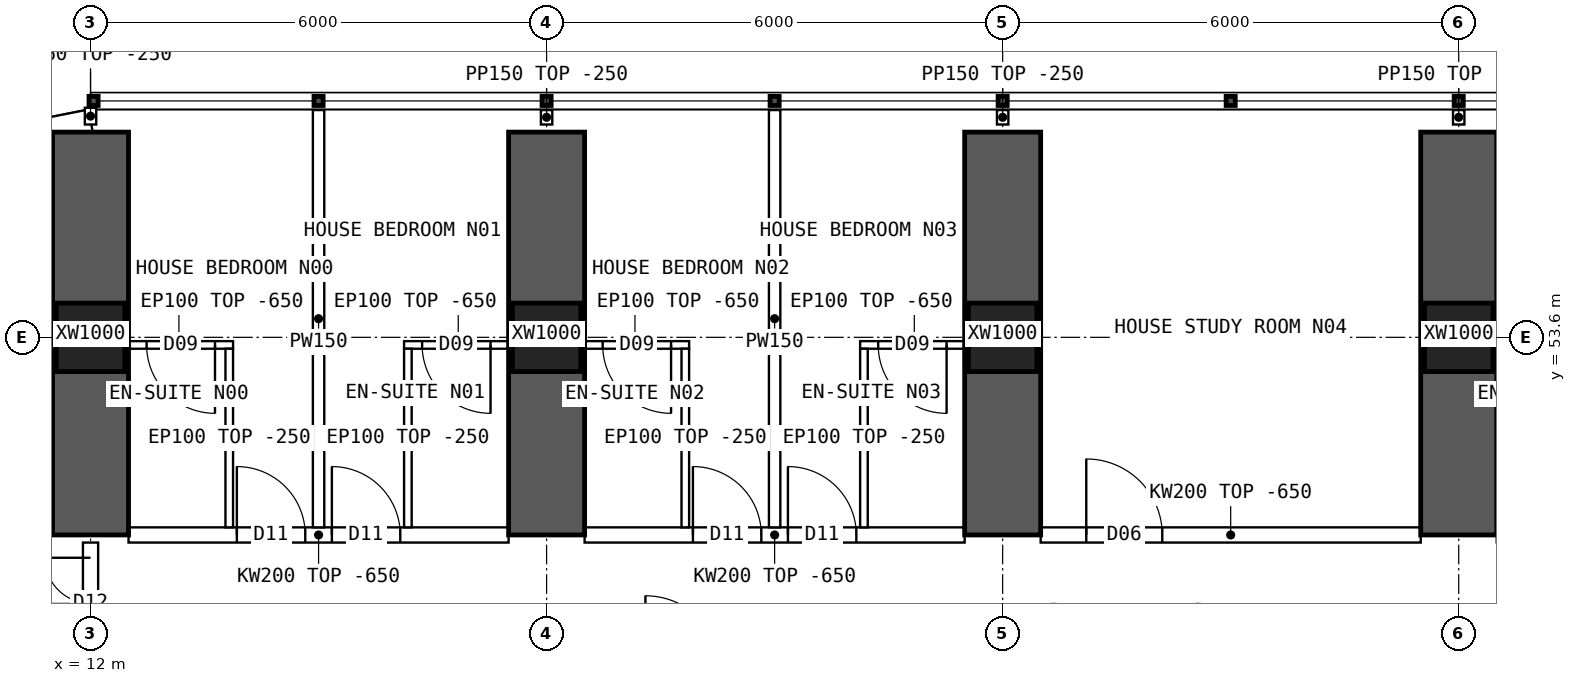
"""IFC4 building model, lengths in metres.
Left out: names, types, materials, properties, quantities, classifications, styles, units other than length and angle.
Written with IfcOpenShell. Run it as: python <this file> out.ifc"""

import sys

from ifc_helpers import new_model, si_unit, direction, frame, frame_2d, origin, origin_2d, place, context, subcontext, project, spatial, polyline, rectangle, hollow_rectangle, outline, extrude, element, fill, save


model = new_model("IFC4")
c1 = context("Model", 3, precision=1e-05, world=origin(), true_north=direction((0.0, 1.0)))
c2 = subcontext(c1, "Body", "Model", "MODEL_VIEW")
j1 = project(units=[si_unit("LENGTHUNIT", "METRE"), si_unit("PLANEANGLEUNIT", "RADIAN")], contexts=[c1])
p1 = place(None, origin())
s1 = spatial("IfcSite", under=j1, at=p1, CompositionType="ELEMENT")
p2 = place(p1, origin())
s2 = spatial("IfcBuilding", under=s1, at=p2, CompositionType="ELEMENT")
p3 = place(p2, frame((0.0, 0.0, 27.7)))
s3 = spatial("IfcBuildingStorey", under=s2, at=p3, CompositionType="ELEMENT", Elevation=27.7)
for number, where, z_axis, x_axis in (
    (1, (12.0, 53.6, 0.0), (0.0, 0.0, 1.0), (1.0, 0.0, 0.0)),
    (2, (18.0, 53.6, 0.0), (0.0, 0.0, 1.0), (1.0, 0.0, 0.0)),
    (3, (24.0, 53.6, 0.0), (0.0, 0.0, 1.0), (1.0, 0.0, 0.0)),
    (4, (30.0, 53.6, 0.0), (0.0, 0.0, 1.0), (1.0, 0.0, 0.0)),
):
    element("IfcColumn", number, at=place(p3, frame(where, z_axis=z_axis, x_axis=x_axis)), inside=s3, PredefinedType="COLUMN", context=c2, shape_type="SweptSolid", body=[
        extrude(hollow_rectangle(XDim=0.9, YDim=0.9, WallThickness=0.09, at=origin_2d()), origin(), (0.0, 0.0, 1.0), 3.75),
    ])
for number, where, z_axis, x_axis in (
    (5, (12.0, 51.0, 0.0), (0.0, 0.0, 1.0), (0.0, 1.0, 0.0)),
    (6, (18.0, 51.0, 0.0), (0.0, 0.0, 1.0), (0.0, 1.0, 0.0)),
    (7, (24.0, 51.0, 0.0), (0.0, 0.0, 1.0), (0.0, 1.0, 0.0)),
    (8, (30.0, 51.0, 0.0), (0.0, 0.0, 1.0), (0.0, 1.0, 0.0)),
):
    element("IfcWall", number, at=place(p3, frame(where, z_axis=z_axis, x_axis=x_axis)), inside=s3, PredefinedType="SHEAR", context=c2, shape_type="SweptSolid", body=[
        extrude(rectangle(XDim=5.3, YDim=1.0, at=frame_2d((2.65, 0.0))), origin(), (0.0, 0.0, 1.0), 3.75),
    ])
p4 = place(p3, frame((12.0, 56.45, 0.0), z_axis=(0.0, 0.0, 1.0), x_axis=(-0.980787251524, -0.195080412259, 0.0)))
e9 = element("IfcWall", 9, at=p4, inside=s3, PredefinedType="SOLIDWALL", context=c2, shape_type="SweptSolid", body=[
    extrude(outline(polyline([(-0.03, -0.15), (3.249, -0.15), (3.189, 0.15), (0.03, 0.15), (-0.03, -0.15)])), origin(), (0.0, 0.0, 1.0), 3.5),
])
p5 = place(p4, frame((0.909, 0.0, 0.9)))
e10 = element("IfcOpeningElement", 10, at=p5, cuts=e9, PredefinedType="OPENING", context=c2, shape_type="SweptSolid", body=[
    extrude(rectangle(XDim=1.4, YDim=1.8, at=frame_2d((0.7, 0.9))), frame((0.0, 0.16, 0.0), z_axis=(0.0, -1.0, 0.0), x_axis=(1.0, 0.0, 0.0)), (0.0, 0.0, 1.0), 0.32),
])
p6 = place(p3, frame((12.5, 51.0, 0.0), z_axis=(0.0, 0.0, 1.0), x_axis=(1.0, 0.0, 0.0)))
e11 = element("IfcWall", 11, at=p6, inside=s3, PredefinedType="SOLIDWALL", context=c2, shape_type="SweptSolid", body=[
    extrude(outline(polyline([(0.0, 0.0), (5.0, 0.0), (5.0, 3.1), (0.0, 3.1), (0.0, 0.0)])), frame((0.0, 0.1, 0.0), z_axis=(0.0, -1.0, 0.0), x_axis=(1.0, 0.0, 0.0)), (0.0, 0.0, 1.0), 0.2),
])
p7 = place(p6, frame((1.425, 0.0, 0.0)))
e12 = element("IfcOpeningElement", 12, at=p7, cuts=e11, PredefinedType="OPENING", context=c2, shape_type="SweptSolid", body=[
    extrude(rectangle(XDim=0.9, YDim=2.1, at=frame_2d((0.45, 1.05))), frame((0.0, 0.11, 0.0), z_axis=(0.0, -1.0, 0.0), x_axis=(1.0, 0.0, 0.0)), (0.0, 0.0, 1.0), 0.22),
])
p8 = place(p6, frame((2.675, 0.0, 0.0)))
e13 = element("IfcOpeningElement", 13, at=p8, cuts=e11, PredefinedType="OPENING", context=c2, shape_type="SweptSolid", body=[
    extrude(rectangle(XDim=0.9, YDim=2.1, at=frame_2d((0.45, 1.05))), frame((0.0, 0.11, 0.0), z_axis=(0.0, -1.0, 0.0), x_axis=(1.0, 0.0, 0.0)), (0.0, 0.0, 1.0), 0.22),
])
p9 = place(p3, frame((18.5, 51.0, 0.0), z_axis=(0.0, 0.0, 1.0), x_axis=(1.0, 0.0, 0.0)))
e14 = element("IfcWall", 14, at=p9, inside=s3, PredefinedType="SOLIDWALL", context=c2, shape_type="SweptSolid", body=[
    extrude(outline(polyline([(0.0, 0.0), (5.0, 0.0), (5.0, 3.1), (0.0, 3.1), (0.0, 0.0)])), frame((0.0, 0.1, 0.0), z_axis=(0.0, -1.0, 0.0), x_axis=(1.0, 0.0, 0.0)), (0.0, 0.0, 1.0), 0.2),
])
p10 = place(p9, frame((1.425, 0.0, 0.0)))
e15 = element("IfcOpeningElement", 15, at=p10, cuts=e14, PredefinedType="OPENING", context=c2, shape_type="SweptSolid", body=[
    extrude(rectangle(XDim=0.9, YDim=2.1, at=frame_2d((0.45, 1.05))), frame((0.0, 0.11, 0.0), z_axis=(0.0, -1.0, 0.0), x_axis=(1.0, 0.0, 0.0)), (0.0, 0.0, 1.0), 0.22),
])
p11 = place(p9, frame((2.675, 0.0, 0.0)))
e16 = element("IfcOpeningElement", 16, at=p11, cuts=e14, PredefinedType="OPENING", context=c2, shape_type="SweptSolid", body=[
    extrude(rectangle(XDim=0.9, YDim=2.1, at=frame_2d((0.45, 1.05))), frame((0.0, 0.11, 0.0), z_axis=(0.0, -1.0, 0.0), x_axis=(1.0, 0.0, 0.0)), (0.0, 0.0, 1.0), 0.22),
])
p12 = place(p3, frame((24.5, 51.0, 0.0), z_axis=(0.0, 0.0, 1.0), x_axis=(1.0, 0.0, 0.0)))
e17 = element("IfcWall", 17, at=p12, inside=s3, PredefinedType="SOLIDWALL", context=c2, shape_type="SweptSolid", body=[
    extrude(outline(polyline([(0.0, 0.0), (5.0, 0.0), (5.0, 3.1), (0.0, 3.1), (0.0, 0.0)])), frame((0.0, 0.1, 0.0), z_axis=(0.0, -1.0, 0.0), x_axis=(1.0, 0.0, 0.0)), (0.0, 0.0, 1.0), 0.2),
])
p13 = place(p12, frame((0.6, 0.0, 0.0)))
e18 = element("IfcOpeningElement", 18, at=p13, cuts=e17, PredefinedType="OPENING", context=c2, shape_type="SweptSolid", body=[
    extrude(rectangle(XDim=1.0, YDim=2.1, at=frame_2d((0.5, 1.05))), frame((0.0, 0.11, 0.0), z_axis=(0.0, -1.0, 0.0), x_axis=(1.0, 0.0, 0.0)), (0.0, 0.0, 1.0), 0.22),
])
p14 = place(p3, frame((15.0, 56.59, 0.0), z_axis=(0.0, 0.0, 1.0), x_axis=(0.0, -1.0, 0.0)))
e19 = element("IfcWall", 19, at=p14, inside=s3, PredefinedType="PARTITIONING", context=c2, shape_type="SweptSolid", body=[
    extrude(outline(polyline([(0.0, 0.0), (5.49, 0.0), (5.49, 3.1), (5.442, 3.1), (5.44, 3.5), (3.192, 3.5), (3.19, 3.1), (2.792, 3.1), (2.79, 3.5), (0.0, 3.5), (0.0, 0.0)])), frame((0.0, 0.075, 0.0), z_axis=(0.0, -1.0, 0.0), x_axis=(1.0, 0.0, 0.0)), (0.0, 0.0, 1.0), 0.15),
])
p15 = place(p3, frame((12.45, 53.5, 0.0), z_axis=(0.0, 0.0, 1.0), x_axis=(1.0, 0.0, 0.0)))
e20 = element("IfcWall", 20, at=p15, inside=s3, PredefinedType="PARTITIONING", context=c2, shape_type="SweptSolid", body=[
    extrude(outline(polyline([(0.0, 0.0), (1.425, 0.0), (1.425, 3.1), (0.0, 3.1), (0.0, 0.0)])), frame((0.0, 0.05, 0.0), z_axis=(0.0, -1.0, 0.0), x_axis=(1.0, 0.0, 0.0)), (0.0, 0.0, 1.0), 0.1),
])
p16 = place(p15, frame((0.288, 0.0, 0.0)))
e21 = element("IfcOpeningElement", 21, at=p16, cuts=e20, PredefinedType="OPENING", context=c2, shape_type="SweptSolid", body=[
    extrude(rectangle(XDim=0.9, YDim=2.1, at=frame_2d((0.45, 1.05))), frame((0.0, 0.06, 0.0), z_axis=(0.0, -1.0, 0.0), x_axis=(1.0, 0.0, 0.0)), (0.0, 0.0, 1.0), 0.12),
])
p17 = place(p3, frame((13.825, 53.45, 0.0), z_axis=(0.0, 0.0, 1.0), x_axis=(0.0, -1.0, 0.0)))
e22 = element("IfcWall", 22, at=p17, inside=s3, PredefinedType="PARTITIONING", context=c2, shape_type="SweptSolid", body=[
    extrude(outline(polyline([(0.0, 0.0), (2.35, 0.0), (2.35, 3.1), (2.302, 3.1), (2.3, 3.5), (0.052, 3.5), (0.05, 3.1), (0.0, 3.1), (0.0, 0.0)])), frame((0.0, 0.05, 0.0), z_axis=(0.0, -1.0, 0.0), x_axis=(1.0, 0.0, 0.0)), (0.0, 0.0, 1.0), 0.1),
])
p18 = place(p3, frame((16.125, 53.5, 0.0), z_axis=(0.0, 0.0, 1.0), x_axis=(1.0, 0.0, 0.0)))
e23 = element("IfcWall", 23, at=p18, inside=s3, PredefinedType="PARTITIONING", context=c2, shape_type="SweptSolid", body=[
    extrude(outline(polyline([(0.0, 0.0), (1.425, 0.0), (1.425, 3.1), (0.0, 3.1), (0.0, 0.0)])), frame((0.0, 0.05, 0.0), z_axis=(0.0, -1.0, 0.0), x_axis=(1.0, 0.0, 0.0)), (0.0, 0.0, 1.0), 0.1),
])
p19 = place(p18, frame((0.238, 0.0, 0.0)))
e24 = element("IfcOpeningElement", 24, at=p19, cuts=e23, PredefinedType="OPENING", context=c2, shape_type="SweptSolid", body=[
    extrude(rectangle(XDim=0.9, YDim=2.1, at=frame_2d((0.45, 1.05))), frame((0.0, 0.06, 0.0), z_axis=(0.0, -1.0, 0.0), x_axis=(1.0, 0.0, 0.0)), (0.0, 0.0, 1.0), 0.12),
])
p20 = place(p3, frame((16.175, 53.45, 0.0), z_axis=(0.0, 0.0, 1.0), x_axis=(0.0, -1.0, 0.0)))
e25 = element("IfcWall", 25, at=p20, inside=s3, PredefinedType="PARTITIONING", context=c2, shape_type="SweptSolid", body=[
    extrude(outline(polyline([(0.0, 0.0), (2.35, 0.0), (2.35, 3.1), (2.302, 3.1), (2.3, 3.5), (0.052, 3.5), (0.05, 3.1), (0.0, 3.1), (0.0, 0.0)])), frame((0.0, 0.05, 0.0), z_axis=(0.0, -1.0, 0.0), x_axis=(1.0, 0.0, 0.0)), (0.0, 0.0, 1.0), 0.1),
])
p21 = place(p3, frame((21.0, 56.59, 0.0), z_axis=(0.0, 0.0, 1.0), x_axis=(0.0, -1.0, 0.0)))
e26 = element("IfcWall", 26, at=p21, inside=s3, PredefinedType="PARTITIONING", context=c2, shape_type="SweptSolid", body=[
    extrude(outline(polyline([(0.0, 0.0), (5.49, 0.0), (5.49, 3.1), (5.442, 3.1), (5.44, 3.5), (3.192, 3.5), (3.19, 3.1), (2.792, 3.1), (2.79, 3.5), (0.0, 3.5), (0.0, 0.0)])), frame((0.0, 0.075, 0.0), z_axis=(0.0, -1.0, 0.0), x_axis=(1.0, 0.0, 0.0)), (0.0, 0.0, 1.0), 0.15),
])
p22 = place(p3, frame((18.45, 53.5, 0.0), z_axis=(0.0, 0.0, 1.0), x_axis=(1.0, 0.0, 0.0)))
e27 = element("IfcWall", 27, at=p22, inside=s3, PredefinedType="PARTITIONING", context=c2, shape_type="SweptSolid", body=[
    extrude(outline(polyline([(0.0, 0.0), (1.425, 0.0), (1.425, 3.1), (0.0, 3.1), (0.0, 0.0)])), frame((0.0, 0.05, 0.0), z_axis=(0.0, -1.0, 0.0), x_axis=(1.0, 0.0, 0.0)), (0.0, 0.0, 1.0), 0.1),
])
p23 = place(p22, frame((0.288, 0.0, 0.0)))
e28 = element("IfcOpeningElement", 28, at=p23, cuts=e27, PredefinedType="OPENING", context=c2, shape_type="SweptSolid", body=[
    extrude(rectangle(XDim=0.9, YDim=2.1, at=frame_2d((0.45, 1.05))), frame((0.0, 0.06, 0.0), z_axis=(0.0, -1.0, 0.0), x_axis=(1.0, 0.0, 0.0)), (0.0, 0.0, 1.0), 0.12),
])
p24 = place(p3, frame((19.825, 53.45, 0.0), z_axis=(0.0, 0.0, 1.0), x_axis=(0.0, -1.0, 0.0)))
e29 = element("IfcWall", 29, at=p24, inside=s3, PredefinedType="PARTITIONING", context=c2, shape_type="SweptSolid", body=[
    extrude(outline(polyline([(0.0, 0.0), (2.35, 0.0), (2.35, 3.1), (2.302, 3.1), (2.3, 3.5), (0.052, 3.5), (0.05, 3.1), (0.0, 3.1), (0.0, 0.0)])), frame((0.0, 0.05, 0.0), z_axis=(0.0, -1.0, 0.0), x_axis=(1.0, 0.0, 0.0)), (0.0, 0.0, 1.0), 0.1),
])
p25 = place(p3, frame((22.125, 53.5, 0.0), z_axis=(0.0, 0.0, 1.0), x_axis=(1.0, 0.0, 0.0)))
e30 = element("IfcWall", 30, at=p25, inside=s3, PredefinedType="PARTITIONING", context=c2, shape_type="SweptSolid", body=[
    extrude(outline(polyline([(0.0, 0.0), (1.425, 0.0), (1.425, 3.1), (0.0, 3.1), (0.0, 0.0)])), frame((0.0, 0.05, 0.0), z_axis=(0.0, -1.0, 0.0), x_axis=(1.0, 0.0, 0.0)), (0.0, 0.0, 1.0), 0.1),
])
p26 = place(p25, frame((0.238, 0.0, 0.0)))
e31 = element("IfcOpeningElement", 31, at=p26, cuts=e30, PredefinedType="OPENING", context=c2, shape_type="SweptSolid", body=[
    extrude(rectangle(XDim=0.9, YDim=2.1, at=frame_2d((0.45, 1.05))), frame((0.0, 0.06, 0.0), z_axis=(0.0, -1.0, 0.0), x_axis=(1.0, 0.0, 0.0)), (0.0, 0.0, 1.0), 0.12),
])
p27 = place(p3, frame((22.175, 53.45, 0.0), z_axis=(0.0, 0.0, 1.0), x_axis=(0.0, -1.0, 0.0)))
e32 = element("IfcWall", 32, at=p27, inside=s3, PredefinedType="PARTITIONING", context=c2, shape_type="SweptSolid", body=[
    extrude(outline(polyline([(0.0, 0.0), (2.35, 0.0), (2.35, 3.1), (2.302, 3.1), (2.3, 3.5), (0.052, 3.5), (0.05, 3.1), (0.0, 3.1), (0.0, 0.0)])), frame((0.0, 0.05, 0.0), z_axis=(0.0, -1.0, 0.0), x_axis=(1.0, 0.0, 0.0)), (0.0, 0.0, 1.0), 0.1),
])
p28 = place(p3, frame((30.45, 53.5, 0.0), z_axis=(0.0, 0.0, 1.0), x_axis=(1.0, 0.0, 0.0)))
e33 = element("IfcWall", 33, at=p28, inside=s3, PredefinedType="PARTITIONING", context=c2, shape_type="SweptSolid", body=[
    extrude(outline(polyline([(0.0, 0.0), (1.425, 0.0), (1.425, 3.1), (0.0, 3.1), (0.0, 0.0)])), frame((0.0, 0.05, 0.0), z_axis=(0.0, -1.0, 0.0), x_axis=(1.0, 0.0, 0.0)), (0.0, 0.0, 1.0), 0.1),
])
p29 = place(p28, frame((0.288, 0.0, 0.0)))
e34 = element("IfcOpeningElement", 34, at=p29, cuts=e33, PredefinedType="OPENING", context=c2, shape_type="SweptSolid", body=[
    extrude(rectangle(XDim=0.9, YDim=2.1, at=frame_2d((0.45, 1.05))), frame((0.0, 0.06, 0.0), z_axis=(0.0, -1.0, 0.0), x_axis=(1.0, 0.0, 0.0)), (0.0, 0.0, 1.0), 0.12),
])
p30 = place(p3, frame((12.0, 49.3, 0.0), z_axis=(0.0, 0.0, 1.0), x_axis=(0.0, 1.0, 0.0)))
e35 = element("IfcWall", 35, at=p30, inside=s3, PredefinedType="SOLIDWALL", context=c2, shape_type="SweptSolid", body=[
    extrude(outline(polyline([(0.0, 0.0), (1.6, 0.0), (1.6, 3.05), (0.0, 3.05), (0.0, 0.0)])), frame((0.0, 0.1, 0.0), z_axis=(0.0, -1.0, 0.0), x_axis=(1.0, 0.0, 0.0)), (0.0, 0.0, 1.0), 0.2),
])
p31 = place(p30, frame((0.2, 0.0, 0.0)))
e36 = element("IfcOpeningElement", 36, at=p31, cuts=e35, PredefinedType="OPENING", context=c2, shape_type="SweptSolid", body=[
    extrude(rectangle(XDim=1.2, YDim=2.1, at=frame_2d((0.6, 1.05))), frame((0.0, 0.11, 0.0), z_axis=(0.0, -1.0, 0.0), x_axis=(1.0, 0.0, 0.0)), (0.0, 0.0, 1.0), 0.22),
])
p32 = place(p3, frame((12.0, 56.4, 0.0), z_axis=(0.0, 0.0, 1.0), x_axis=(0.0, 1.0, 0.0)))
e37 = element("IfcWall", 37, at=p32, inside=s3, PredefinedType="PARTITIONING", context=c2, shape_type="SweptSolid", body=[
    extrude(rectangle(XDim=0.22, YDim=0.15, at=frame_2d((0.11, 0.0))), origin(), (0.0, 0.0, 1.0), 3.5),
])
for number, where, z_axis, x_axis in (
    (38, (18.0, 56.4, 0.0), (0.0, 0.0, 1.0), (0.0, 1.0, 0.0)),
    (39, (24.0, 56.4, 0.0), (0.0, 0.0, 1.0), (0.0, 1.0, 0.0)),
    (40, (30.0, 56.4, 0.0), (0.0, 0.0, 1.0), (0.0, 1.0, 0.0)),
):
    element("IfcWall", number, at=place(p3, frame(where, z_axis=z_axis, x_axis=x_axis)), inside=s3, PredefinedType="PARTITIONING", context=c2, shape_type="SweptSolid", body=[
        extrude(rectangle(XDim=0.19, YDim=0.15, at=frame_2d((0.095, 0.0))), origin(), (0.0, 0.0, 1.0), 3.5),
    ])
p33 = place(p16, origin())
e41 = element("IfcDoor", 41, at=p33, inside=s3, OperationType="SINGLE_SWING_RIGHT", PredefinedType="DOOR", context=c2, shape_type="SweptSolid", body=[
    extrude(rectangle(XDim=0.9, YDim=2.1, at=frame_2d((0.45, 1.05))), frame((0.0, 0.025, 0.0), z_axis=(0.0, -1.0, 0.0), x_axis=(1.0, 0.0, 0.0)), (0.0, 0.0, 1.0), 0.05),
])
fill(e21, e41)
p34 = place(p7, origin())
e42 = element("IfcDoor", 42, at=p34, inside=s3, OperationType="SINGLE_SWING_LEFT", PredefinedType="DOOR", context=c2, shape_type="SweptSolid", body=[
    extrude(rectangle(XDim=0.9, YDim=2.1, at=frame_2d((0.45, 1.05))), frame((0.0, 0.025, 0.0), z_axis=(0.0, -1.0, 0.0), x_axis=(1.0, 0.0, 0.0)), (0.0, 0.0, 1.0), 0.05),
])
fill(e12, e42)
p35 = place(p19, origin())
e43 = element("IfcDoor", 43, at=p35, inside=s3, OperationType="SINGLE_SWING_RIGHT", PredefinedType="DOOR", context=c2, shape_type="SweptSolid", body=[
    extrude(rectangle(XDim=0.9, YDim=2.1, at=frame_2d((0.45, 1.05))), frame((0.0, 0.025, 0.0), z_axis=(0.0, -1.0, 0.0), x_axis=(1.0, 0.0, 0.0)), (0.0, 0.0, 1.0), 0.05),
])
fill(e24, e43)
p36 = place(p8, origin())
e44 = element("IfcDoor", 44, at=p36, inside=s3, OperationType="SINGLE_SWING_LEFT", PredefinedType="DOOR", context=c2, shape_type="SweptSolid", body=[
    extrude(rectangle(XDim=0.9, YDim=2.1, at=frame_2d((0.45, 1.05))), frame((0.0, 0.025, 0.0), z_axis=(0.0, -1.0, 0.0), x_axis=(1.0, 0.0, 0.0)), (0.0, 0.0, 1.0), 0.05),
])
fill(e13, e44)
p37 = place(p23, origin())
e45 = element("IfcDoor", 45, at=p37, inside=s3, OperationType="SINGLE_SWING_RIGHT", PredefinedType="DOOR", context=c2, shape_type="SweptSolid", body=[
    extrude(rectangle(XDim=0.9, YDim=2.1, at=frame_2d((0.45, 1.05))), frame((0.0, 0.025, 0.0), z_axis=(0.0, -1.0, 0.0), x_axis=(1.0, 0.0, 0.0)), (0.0, 0.0, 1.0), 0.05),
])
fill(e28, e45)
p38 = place(p10, origin())
e46 = element("IfcDoor", 46, at=p38, inside=s3, OperationType="SINGLE_SWING_LEFT", PredefinedType="DOOR", context=c2, shape_type="SweptSolid", body=[
    extrude(rectangle(XDim=0.9, YDim=2.1, at=frame_2d((0.45, 1.05))), frame((0.0, 0.025, 0.0), z_axis=(0.0, -1.0, 0.0), x_axis=(1.0, 0.0, 0.0)), (0.0, 0.0, 1.0), 0.05),
])
fill(e15, e46)
p39 = place(p26, origin())
e47 = element("IfcDoor", 47, at=p39, inside=s3, OperationType="SINGLE_SWING_RIGHT", PredefinedType="DOOR", context=c2, shape_type="SweptSolid", body=[
    extrude(rectangle(XDim=0.9, YDim=2.1, at=frame_2d((0.45, 1.05))), frame((0.0, 0.025, 0.0), z_axis=(0.0, -1.0, 0.0), x_axis=(1.0, 0.0, 0.0)), (0.0, 0.0, 1.0), 0.05),
])
fill(e31, e47)
p40 = place(p11, origin())
e48 = element("IfcDoor", 48, at=p40, inside=s3, OperationType="SINGLE_SWING_LEFT", PredefinedType="DOOR", context=c2, shape_type="SweptSolid", body=[
    extrude(rectangle(XDim=0.9, YDim=2.1, at=frame_2d((0.45, 1.05))), frame((0.0, 0.025, 0.0), z_axis=(0.0, -1.0, 0.0), x_axis=(1.0, 0.0, 0.0)), (0.0, 0.0, 1.0), 0.05),
])
fill(e16, e48)
p41 = place(p13, origin())
e49 = element("IfcDoor", 49, at=p41, inside=s3, OperationType="SINGLE_SWING_LEFT", PredefinedType="DOOR", context=c2, shape_type="SweptSolid", body=[
    extrude(rectangle(XDim=1.0, YDim=2.1, at=frame_2d((0.5, 1.05))), frame((0.0, 0.025, 0.0), z_axis=(0.0, -1.0, 0.0), x_axis=(1.0, 0.0, 0.0)), (0.0, 0.0, 1.0), 0.05),
])
fill(e18, e49)
p42 = place(p31, origin())
e50 = element("IfcDoor", 50, at=p42, inside=s3, OperationType="DOUBLE_DOOR_SINGLE_SWING", PredefinedType="DOOR", context=c2, shape_type="SweptSolid", body=[
    extrude(rectangle(XDim=1.2, YDim=2.1, at=frame_2d((0.6, 1.05))), frame((0.0, 0.025, 0.0), z_axis=(0.0, -1.0, 0.0), x_axis=(1.0, 0.0, 0.0)), (0.0, 0.0, 1.0), 0.05),
])
fill(e36, e50)
save(model, sys.argv[1])
